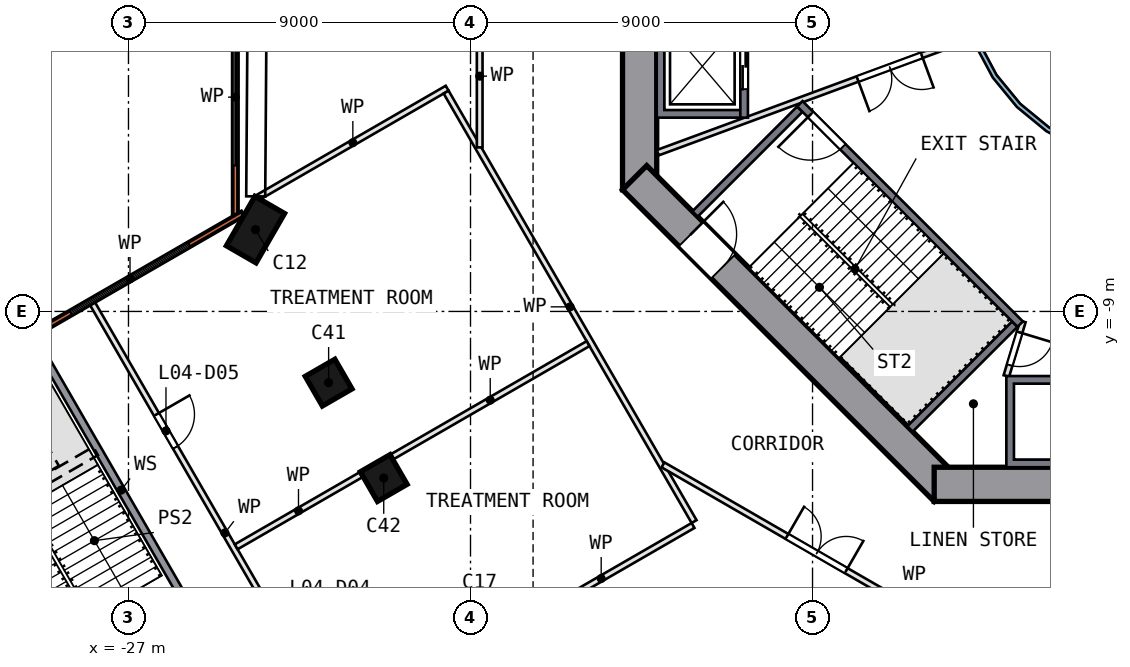
"""IFC4 building model, lengths in metres.
Left out: names, types, materials, properties, quantities, classifications, styles, units other than length and angle.
Written with IfcOpenShell. Run it as: python <this file> out.ifc"""

import sys

from ifc_helpers import new_model, si_unit, direction, frame, frame_2d, origin, origin_2d, place, context, subcontext, project, spatial, polyline, rectangle, outline, extrude, element, fill, save


model = new_model("IFC4")
c1 = context("Model", 3, precision=1e-05, world=origin(), true_north=direction((0.0, 1.0)))
c2 = subcontext(c1, "Body", "Model", "MODEL_VIEW")
j1 = project(units=[si_unit("LENGTHUNIT", "METRE"), si_unit("PLANEANGLEUNIT", "RADIAN")], contexts=[c1])
p1 = place(None, origin())
s1 = spatial("IfcSite", under=j1, at=p1, CompositionType="ELEMENT")
p2 = place(p1, origin())
s2 = spatial("IfcBuilding", under=s1, at=p2, CompositionType="ELEMENT")
p3 = place(p2, frame((0.0, 0.0, 23.5)))
s3 = spatial("IfcBuildingStorey", under=s2, at=p3, CompositionType="ELEMENT", Elevation=23.5)
p4 = place(p3, frame((-23.658, -6.846, 0.0), z_axis=(0.0, 0.0, 1.0), x_axis=(0.5, 0.866025404, 0.0)))
e1 = element("IfcColumn", 1, at=p4, inside=s3, PredefinedType="COLUMN", context=c2, shape_type="SweptSolid", body=[
    extrude(rectangle(XDim=1.5, YDim=0.9, at=origin_2d()), origin(), (0.0, 0.0, 1.0), 4.0),
])
for number, where, z_axis, x_axis in (
    (2, (-21.733, -10.873, 0.0), (0.0, 0.0, 1.0), (-0.866, -0.5, 0.0)),
    (3, (-20.283, -13.385, 0.0), (0.0, 0.0, 1.0), (-0.866, -0.5, 0.0)),
):
    element("IfcColumn", number, at=place(p3, frame(where, z_axis=z_axis, x_axis=x_axis)), inside=s3, PredefinedType="COLUMN", context=c2, shape_type="SweptSolid", body=[
        extrude(rectangle(XDim=0.9, YDim=0.9, at=origin_2d()), origin(), (0.0, 0.0, 1.0), 4.0),
    ])
p5 = place(p3, frame((-13.55, 5.799, 0.0), z_axis=(0.0, 0.0, 1.0), x_axis=(0.0, -1.0, 0.0)))
e4 = element("IfcWall", 4, at=p5, inside=s3, PredefinedType="SHEAR", context=c2, shape_type="SweptSolid", body=[
    extrude(rectangle(XDim=11.598, YDim=0.9, at=frame_2d((5.799, 0.0))), origin(), (0.0, 0.0, 1.0), 4.5),
])
p6 = place(p5, frame((4.899, 0.0, 0.0)))
e5 = element("IfcOpeningElement", 5, at=p6, cuts=e4, PredefinedType="OPENING", context=c2, shape_type="SweptSolid", body=[
    extrude(rectangle(XDim=1.8, YDim=2.1, at=frame_2d((0.9, 1.05))), frame((0.0, 0.46, 0.0), z_axis=(0.0, -1.0, 0.0), x_axis=(1.0, 0.0, 0.0)), (0.0, 0.0, 1.0), 0.92),
])
p7 = place(p3, frame((-13.682, -5.481, 0.0), z_axis=(0.0, 0.0, 1.0), x_axis=(0.707106781, -0.707106781, 0.0)))
e6 = element("IfcWall", 6, at=p7, inside=s3, PredefinedType="SHEAR", context=c2, shape_type="SweptSolid", body=[
    extrude(rectangle(XDim=11.598, YDim=0.9, at=frame_2d((5.799, 0.0))), origin(), (0.0, 0.0, 1.0), 4.5),
])
p8 = place(p7, frame((2.099, 0.0, 0.0)))
e7 = element("IfcOpeningElement", 7, at=p8, cuts=e6, PredefinedType="OPENING", context=c2, shape_type="SweptSolid", body=[
    extrude(rectangle(XDim=1.2, YDim=2.1, at=frame_2d((0.6, 1.05))), frame((0.0, 0.46, 0.0), z_axis=(0.0, -1.0, 0.0), x_axis=(1.0, 0.0, 0.0)), (0.0, 0.0, 1.0), 0.92),
])
p9 = place(p3, frame((-5.799, -13.55, 0.0), z_axis=(0.0, 0.0, 1.0), x_axis=(1.0, 0.0, 0.0)))
e8 = element("IfcWall", 8, at=p9, inside=s3, PredefinedType="SHEAR", context=c2, shape_type="SweptSolid", body=[
    extrude(rectangle(XDim=11.598, YDim=0.9, at=frame_2d((5.799, 0.0))), origin(), (0.0, 0.0, 1.0), 4.5),
])
p10 = place(p9, frame((4.899, 0.0, 0.0)))
e9 = element("IfcOpeningElement", 9, at=p10, cuts=e8, PredefinedType="OPENING", context=c2, shape_type="SweptSolid", body=[
    extrude(rectangle(XDim=1.8, YDim=2.1, at=frame_2d((0.9, 1.05))), frame((0.0, 0.46, 0.0), z_axis=(0.0, -1.0, 0.0), x_axis=(1.0, 0.0, 0.0)), (0.0, 0.0, 1.0), 0.92),
])
p11 = place(p3, frame((-24.188, 6.341, 0.0), z_axis=(0.0, 0.0, 1.0), x_axis=(0.0, -1.0, 0.0)))
e10 = element("IfcWall", 10, at=p11, inside=s3, PredefinedType="SOLIDWALL", context=c2, shape_type="SweptSolid", body=[
    extrude(rectangle(XDim=12.801, YDim=0.14, at=frame_2d((6.4, 0.0))), origin(), (0.0, 0.0, 1.0), 4.0),
])
p12 = place(p11, frame((1.748, 0.0, 0.9)))
e11 = element("IfcOpeningElement", 11, at=p12, cuts=e10, PredefinedType="OPENING", context=c2, shape_type="SweptSolid", body=[
    extrude(rectangle(XDim=3.0, YDim=2.4, at=frame_2d((1.5, 1.2))), frame((0.0, 0.08, 0.0), z_axis=(0.0, -1.0, 0.0), x_axis=(1.0, 0.0, 0.0)), (0.0, 0.0, 1.0), 0.16),
])
p13 = place(p11, frame((7.902, 0.0, 0.9)))
e12 = element("IfcOpeningElement", 12, at=p13, cuts=e10, PredefinedType="OPENING", context=c2, shape_type="SweptSolid", body=[
    extrude(rectangle(XDim=3.6, YDim=2.4, at=frame_2d((1.8, 1.2))), frame((0.0, 0.08, 0.0), z_axis=(0.0, -1.0, 0.0), x_axis=(1.0, 0.0, 0.0)), (0.0, 0.0, 1.0), 0.16),
])
p14 = place(p3, frame((-23.995, -6.429, 0.0), z_axis=(0.0, 0.0, 1.0), x_axis=(-0.866018753, -0.500011519, 0.0)))
e13 = element("IfcWall", 13, at=p14, inside=s3, PredefinedType="SOLIDWALL", context=c2, shape_type="SweptSolid", body=[
    extrude(rectangle(XDim=11.405, YDim=0.14, at=frame_2d((5.703, 0.0))), origin(), (0.0, 0.0, 1.0), 4.0),
])
p15 = place(p14, frame((1.623, 0.0, 0.9)))
e14 = element("IfcOpeningElement", 14, at=p15, cuts=e13, PredefinedType="OPENING", context=c2, shape_type="SweptSolid", body=[
    extrude(rectangle(XDim=3.6, YDim=2.4, at=frame_2d((1.8, 1.2))), frame((0.0, 0.08, 0.0), z_axis=(0.0, -1.0, 0.0), x_axis=(1.0, 0.0, 0.0)), (0.0, 0.0, 1.0), 0.16),
])
p16 = place(p3, origin())
e15 = element("IfcWall", 15, at=p16, inside=s3, PredefinedType="SOLIDWALL", context=c2, shape_type="SweptSolid", body=[
    extrude(outline(polyline([(-13.1, -3.9), (-13.1, -1.2), (-10.9, -1.2), (-10.9, -1.4), (-12.9, -1.4), (-12.9, -3.7), (-10.9, -3.7), (-10.9, -3.9), (-13.1, -3.9)])), origin(), (0.0, 0.0, 1.0), 4.0),
])
p17 = place(p3, frame((-10.8, -1.2, 0.0), z_axis=(0.0, 0.0, 1.0), x_axis=(0.0, -1.0, 0.0)))
e16 = element("IfcWall", 16, at=p17, inside=s3, PredefinedType="SOLIDWALL", context=c2, shape_type="SweptSolid", body=[
    extrude(rectangle(XDim=2.7, YDim=0.2, at=frame_2d((1.35, 0.0))), origin(), (0.0, 0.0, 1.0), 4.0),
])
p18 = place(p17, frame((0.75, 0.0, 0.0)))
e17 = element("IfcOpeningElement", 17, at=p18, cuts=e16, PredefinedType="OPENING", context=c2, shape_type="SweptSolid", body=[
    extrude(rectangle(XDim=1.2, YDim=2.1, at=frame_2d((0.6, 1.05))), frame((0.0, 0.11, 0.0), z_axis=(0.0, -1.0, 0.0), x_axis=(1.0, 0.0, 0.0)), (0.0, 0.0, 1.0), 0.22),
])
p19 = place(p3, origin())
e18 = element("IfcWall", 18, at=p19, inside=s3, PredefinedType="SOLIDWALL", context=c2, shape_type="SweptSolid", body=[
    extrude(outline(polyline([(-1.2, -13.1), (-3.9, -13.1), (-3.9, -10.7), (-1.2, -10.7), (-1.2, -13.1)]), holes=[polyline([(-3.7, -10.9), (-3.7, -12.9), (-1.4, -12.9), (-1.4, -10.9), (-3.7, -10.9)])]), origin(), (0.0, 0.0, 1.0), 4.0),
])
p20 = place(p3, frame((-3.535, -9.334, 0.0), z_axis=(0.0, 0.0, 1.0), x_axis=(-0.707106781, 0.707106781, 0.0)))
e19 = element("IfcWall", 19, at=p20, inside=s3, PredefinedType="SOLIDWALL", context=c2, shape_type="SweptSolid", body=[
    extrude(rectangle(XDim=8.2, YDim=0.2, at=frame_2d((4.1, 0.0))), origin(), (0.0, 0.0, 1.0), 4.0),
])
p21 = place(p20, frame((6.6, 0.0, 0.0)))
e20 = element("IfcOpeningElement", 20, at=p21, cuts=e19, PredefinedType="OPENING", context=c2, shape_type="SweptSolid", body=[
    extrude(rectangle(XDim=1.2, YDim=2.1, at=frame_2d((0.6, 1.05))), frame((0.0, 0.11, 0.0), z_axis=(0.0, -1.0, 0.0), x_axis=(1.0, 0.0, 0.0)), (0.0, 0.0, 1.0), 0.22),
])
for number, where, z_axis, x_axis in (
    (21, (-9.334, -3.677, 0.0), (0.0, 0.0, 1.0), (-0.707, -0.707, 0.0)),
    (22, (-3.677, -9.334, 0.0), (0.0, 0.0, 1.0), (-0.707, -0.707, 0.0)),
):
    element("IfcWall", number, at=place(p3, frame(where, z_axis=z_axis, x_axis=x_axis)), inside=s3, PredefinedType="SOLIDWALL", context=c2, shape_type="SweptSolid", body=[
        extrude(rectangle(XDim=3.9, YDim=0.2, at=frame_2d((1.95, 0.0))), origin(), (0.0, 0.0, 1.0), 4.0),
    ])
p22 = place(p3, frame((-3.465, -9.263, 0.0), z_axis=(0.0, 0.0, 1.0), x_axis=(-0.289808785, -0.957084567, 0.0)))
e23 = element("IfcWall", 23, at=p22, inside=s3, PredefinedType="PARTITIONING", context=c2, shape_type="SweptSolid", body=[
    extrude(rectangle(XDim=1.501, YDim=0.15, at=frame_2d((0.75, 0.0))), origin(), (0.0, 0.0, 1.0), 4.0),
])
p23 = place(p22, frame((0.301, 0.0, 0.0)))
e24 = element("IfcOpeningElement", 24, at=p23, cuts=e23, PredefinedType="OPENING", context=c2, shape_type="SweptSolid", body=[
    extrude(rectangle(XDim=0.9, YDim=2.1, at=frame_2d((0.45, 1.05))), frame((0.0, 0.085, 0.0), z_axis=(0.0, -1.0, 0.0), x_axis=(1.0, 0.0, 0.0)), (0.0, 0.0, 1.0), 0.17),
])
p24 = place(p3, frame((-4.813, -1.776, 0.0), z_axis=(0.0, 0.0, 1.0), x_axis=(-0.93819293, -0.346112737, 0.0)))
e25 = element("IfcWall", 25, at=p24, inside=s3, PredefinedType="PARTITIONING", context=c2, shape_type="SweptSolid", body=[
    extrude(rectangle(XDim=8.803, YDim=0.15, at=frame_2d((4.402, 0.0))), origin(), (0.0, 0.0, 1.0), 4.0),
])
p25 = place(p24, frame((1.4, 0.0, 0.0)))
e26 = element("IfcOpeningElement", 26, at=p25, cuts=e25, PredefinedType="OPENING", context=c2, shape_type="SweptSolid", body=[
    extrude(rectangle(XDim=1.8, YDim=2.1, at=frame_2d((0.9, 1.05))), frame((0.0, 0.085, 0.0), z_axis=(0.0, -1.0, 0.0), x_axis=(1.0, 0.0, 0.0)), (0.0, 0.0, 1.0), 0.17),
])
p26 = place(p3, origin())
e27 = element("IfcWall", 27, at=p26, inside=s3, PredefinedType="SOLIDWALL", context=c2, shape_type="SweptSolid", body=[
    extrude(outline(polyline([(5.021, -0.999), (4.73, -1.959), (4.257, -2.844), (3.62, -3.62), (2.844, -4.257), (1.959, -4.73), (0.999, -5.021), (0.0, -5.12), (-0.999, -5.021), (-1.959, -4.73), (-2.844, -4.257), (-3.62, -3.62), (-4.257, -2.844), (-4.73, -1.959), (-5.021, -0.999), (-5.12, 0.0), (-5.021, 0.999), (-4.73, 1.959), (-4.257, 2.844), (-3.62, 3.62), (-2.844, 4.257), (-1.959, 4.73), (-0.999, 5.021), (0.0, 5.12), (0.999, 5.021), (1.959, 4.73), (2.844, 4.257), (3.62, 3.62), (4.257, 2.844), (4.73, 1.959), (5.021, 0.999), (5.12, 0.0), (5.021, -0.999)]), holes=[polyline([(4.904, 0.976), (4.619, 1.913), (4.157, 2.778), (3.535, 3.535), (2.778, 4.157), (1.913, 4.619), (0.976, 4.904), (0.0, 5.0), (-0.976, 4.904), (-1.913, 4.619), (-2.778, 4.157), (-3.535, 3.535), (-4.157, 2.778), (-4.619, 1.913), (-4.904, 0.976), (-5.0, 0.0), (-4.904, -0.976), (-4.619, -1.913), (-4.157, -2.778), (-3.535, -3.535), (-2.778, -4.157), (-1.913, -4.619), (-0.976, -4.904), (0.0, -5.0), (0.976, -4.904), (1.913, -4.619), (2.778, -4.157), (3.535, -3.535), (4.157, -2.778), (4.619, -1.913), (4.904, -0.976), (5.0, 0.0), (4.904, 0.976)])]), origin(), (0.0, 0.0, 1.0), 4.0),
])
p27 = place(p3, frame((-32.807, -13.577, 0.0), z_axis=(0.0, 0.0, 1.0), x_axis=(0.50000534, -0.866022321, 0.0)))
e28 = element("IfcWall", 28, at=p27, inside=s3, PredefinedType="SOLIDWALL", context=c2, shape_type="SweptSolid", body=[
    extrude(rectangle(XDim=7.545, YDim=0.2, at=frame_2d((3.773, 0.0))), origin(), (0.0, 0.0, 1.0), 4.0),
])
p28 = place(p3, frame((-24.877, -17.712, 0.0), z_axis=(0.0, 0.0, 1.0), x_axis=(-0.499984148, 0.866034555, 0.0)))
e29 = element("IfcWall", 29, at=p28, inside=s3, PredefinedType="SOLIDWALL", context=c2, shape_type="SweptSolid", body=[
    extrude(rectangle(XDim=9.26, YDim=0.2, at=frame_2d((4.63, 0.0))), origin(), (0.0, 0.0, 1.0), 4.0),
])
p29 = place(p3, frame((-27.948, -8.792, 0.0), z_axis=(0.0, 0.0, 1.0), x_axis=(0.499991053, -0.866030569, 0.0)))
e30 = element("IfcWall", 30, at=p29, inside=s3, PredefinedType="PARTITIONING", context=c2, shape_type="SweptSolid", body=[
    extrude(rectangle(XDim=12.72, YDim=0.15, at=frame_2d((6.36, 0.0))), origin(), (0.0, 0.0, 1.0), 4.0),
])
p30 = place(p29, frame((9.57, 0.0, 0.0)))
e31 = element("IfcOpeningElement", 31, at=p30, cuts=e30, PredefinedType="OPENING", context=c2, shape_type="SweptSolid", body=[
    extrude(rectangle(XDim=1.0, YDim=2.1, at=frame_2d((0.5, 1.05))), frame((0.0, 0.085, 0.0), z_axis=(0.0, -1.0, 0.0), x_axis=(1.0, 0.0, 0.0)), (0.0, 0.0, 1.0), 0.17),
])
p31 = place(p29, frame((3.37, 0.0, 0.0)))
e32 = element("IfcOpeningElement", 32, at=p31, cuts=e30, PredefinedType="OPENING", context=c2, shape_type="SweptSolid", body=[
    extrude(rectangle(XDim=1.0, YDim=2.1, at=frame_2d((0.5, 1.05))), frame((0.0, 0.085, 0.0), z_axis=(0.0, -1.0, 0.0), x_axis=(1.0, 0.0, 0.0)), (0.0, 0.0, 1.0), 0.17),
])
p32 = place(p3, frame((-18.614, -3.126, 0.0), z_axis=(0.0, 0.0, 1.0), x_axis=(-0.866030255, -0.499991598, 0.0)))
e33 = element("IfcWall", 33, at=p32, inside=s3, PredefinedType="PARTITIONING", context=c2, shape_type="SweptSolid", body=[
    extrude(rectangle(XDim=5.732, YDim=0.15, at=frame_2d((2.866, 0.0))), origin(), (0.0, 0.0, 1.0), 4.0),
])
p33 = place(p3, frame((-18.642, -3.228, 0.0), z_axis=(0.0, 0.0, 1.0), x_axis=(0.499998298, -0.866026387, 0.0)))
e34 = element("IfcWall", 34, at=p33, inside=s3, PredefinedType="PARTITIONING", context=c2, shape_type="SweptSolid", body=[
    extrude(rectangle(XDim=13.05, YDim=0.15, at=frame_2d((6.525, 0.0))), origin(), (0.0, 0.0, 1.0), 4.0),
])
p34 = place(p3, frame((-17.758, 4.833, 0.0), z_axis=(0.0, 0.0, 1.0), x_axis=(0.0, -1.0, 0.0)))
e35 = element("IfcWall", 35, at=p34, inside=s3, PredefinedType="PARTITIONING", context=c2, shape_type="SweptSolid", body=[
    extrude(rectangle(XDim=9.517, YDim=0.15, at=frame_2d((4.758, 0.0))), origin(), (0.0, 0.0, 1.0), 4.0),
])
p35 = place(p34, frame((3.767, 0.0, 0.0)))
e36 = element("IfcOpeningElement", 36, at=p35, cuts=e35, PredefinedType="OPENING", context=c2, shape_type="SweptSolid", body=[
    extrude(rectangle(XDim=1.8, YDim=2.1, at=frame_2d((0.9, 1.05))), frame((0.0, 0.085, 0.0), z_axis=(0.0, -1.0, 0.0), x_axis=(1.0, 0.0, 0.0)), (0.0, 0.0, 1.0), 0.17),
])
p36 = place(p3, frame((-16.978, -17.424, 0.0), z_axis=(0.0, 0.0, 1.0), x_axis=(0.866016603, 0.500015243, 0.0)))
e37 = element("IfcWall", 37, at=p36, inside=s3, PredefinedType="PARTITIONING", context=c2, shape_type="SweptSolid", body=[
    extrude(rectangle(XDim=5.582, YDim=0.15, at=frame_2d((2.791, 0.0))), origin(), (0.0, 0.0, 1.0), 4.0),
])
p37 = place(p3, frame((-20.886, -13.3, 0.0), z_axis=(0.0, 0.0, 1.0), x_axis=(-0.866012734, -0.500021944, 0.0)))
e38 = element("IfcWall", 38, at=p37, inside=s3, PredefinedType="PARTITIONING", context=c2, shape_type="SweptSolid", body=[
    extrude(rectangle(XDim=3.787, YDim=0.15, at=frame_2d((1.894, 0.0))), origin(), (0.0, 0.0, 1.0), 4.0),
])
p38 = place(p3, frame((-14.906, -9.848, 0.0), z_axis=(0.0, 0.0, 1.0), x_axis=(-0.866038559, -0.499977214, 0.0)))
e39 = element("IfcWall", 39, at=p38, inside=s3, PredefinedType="PARTITIONING", context=c2, shape_type="SweptSolid", body=[
    extrude(rectangle(XDim=5.945, YDim=0.15, at=frame_2d((2.973, 0.0))), origin(), (0.0, 0.0, 1.0), 4.0),
])
p39 = place(p3, frame((-12.935, -13.038, 0.0), z_axis=(0.0, 0.0, 1.0), x_axis=(0.866027519, -0.499996337, 0.0)))
e40 = element("IfcWall", 40, at=p39, inside=s3, PredefinedType="PARTITIONING", context=c2, shape_type="SweptSolid", body=[
    extrude(rectangle(XDim=9.517, YDim=0.15, at=frame_2d((4.758, 0.0))), origin(), (0.0, 0.0, 1.0), 4.0),
])
p40 = place(p39, frame((3.767, 0.0, 0.0)))
e41 = element("IfcOpeningElement", 41, at=p40, cuts=e40, PredefinedType="OPENING", context=c2, shape_type="SweptSolid", body=[
    extrude(rectangle(XDim=1.8, YDim=2.1, at=frame_2d((0.9, 1.05))), frame((0.0, 0.085, 0.0), z_axis=(0.0, -1.0, 0.0), x_axis=(1.0, 0.0, 0.0)), (0.0, 0.0, 1.0), 0.17),
])
p41 = place(p13, origin())
e42 = element("IfcWindow", 42, at=p41, inside=s3, PartitioningType="SINGLE_PANEL", PredefinedType="WINDOW", context=c2, shape_type="SweptSolid", body=[
    extrude(rectangle(XDim=3.6, YDim=2.4, at=frame_2d((1.8, 1.2))), frame((0.0, 0.03, 0.0), z_axis=(0.0, -1.0, 0.0), x_axis=(1.0, 0.0, 0.0)), (0.0, 0.0, 1.0), 0.06),
])
fill(e12, e42)
p42 = place(p15, origin())
e43 = element("IfcWindow", 43, at=p42, inside=s3, PartitioningType="SINGLE_PANEL", PredefinedType="WINDOW", context=c2, shape_type="SweptSolid", body=[
    extrude(rectangle(XDim=3.6, YDim=2.4, at=frame_2d((1.8, 1.2))), frame((0.0, 0.03, 0.0), z_axis=(0.0, -1.0, 0.0), x_axis=(1.0, 0.0, 0.0)), (0.0, 0.0, 1.0), 0.06),
])
fill(e14, e43)
p43 = place(p18, origin())
e44 = element("IfcDoor", 44, at=p43, inside=s3, OperationType="DOUBLE_DOOR_SLIDING", PredefinedType="DOOR", context=c2, shape_type="SweptSolid", body=[
    extrude(rectangle(XDim=1.2, YDim=2.1, at=frame_2d((0.6, 1.05))), frame((0.0, 0.025, 0.0), z_axis=(0.0, -1.0, 0.0), x_axis=(1.0, 0.0, 0.0)), (0.0, 0.0, 1.0), 0.05),
])
fill(e17, e44)
p44 = place(p21, origin())
e45 = element("IfcDoor", 45, at=p44, inside=s3, OperationType="SINGLE_SWING_RIGHT", PredefinedType="DOOR", context=c2, shape_type="SweptSolid", body=[
    extrude(rectangle(XDim=1.2, YDim=2.1, at=frame_2d((0.6, 1.05))), frame((0.0, 0.025, 0.0), z_axis=(0.0, -1.0, 0.0), x_axis=(1.0, 0.0, 0.0)), (0.0, 0.0, 1.0), 0.05),
])
fill(e20, e45)
p45 = place(p8, origin())
e46 = element("IfcDoor", 46, at=p45, inside=s3, OperationType="SINGLE_SWING_LEFT", PredefinedType="DOOR", context=c2, shape_type="SweptSolid", body=[
    extrude(rectangle(XDim=1.2, YDim=2.1, at=frame_2d((0.6, 1.05))), frame((0.0, 0.025, 0.0), z_axis=(0.0, -1.0, 0.0), x_axis=(1.0, 0.0, 0.0)), (0.0, 0.0, 1.0), 0.05),
])
fill(e7, e46)
p46 = place(p23, origin())
e47 = element("IfcDoor", 47, at=p46, inside=s3, OperationType="SINGLE_SWING_LEFT", PredefinedType="DOOR", context=c2, shape_type="SweptSolid", body=[
    extrude(rectangle(XDim=0.9, YDim=2.1, at=frame_2d((0.45, 1.05))), frame((0.0, 0.025, 0.0), z_axis=(0.0, -1.0, 0.0), x_axis=(1.0, 0.0, 0.0)), (0.0, 0.0, 1.0), 0.05),
])
fill(e24, e47)
p47 = place(p25, origin())
e48 = element("IfcDoor", 48, at=p47, inside=s3, OperationType="DOUBLE_DOOR_SINGLE_SWING", PredefinedType="DOOR", context=c2, shape_type="SweptSolid", body=[
    extrude(rectangle(XDim=1.8, YDim=2.1, at=frame_2d((0.9, 1.05))), frame((0.0, 0.025, 0.0), z_axis=(0.0, -1.0, 0.0), x_axis=(1.0, 0.0, 0.0)), (0.0, 0.0, 1.0), 0.05),
])
fill(e26, e48)
p48 = place(p31, origin())
e49 = element("IfcDoor", 49, at=p48, inside=s3, OperationType="SINGLE_SWING_LEFT", PredefinedType="DOOR", context=c2, shape_type="SweptSolid", body=[
    extrude(rectangle(XDim=1.0, YDim=2.1, at=frame_2d((0.5, 1.05))), frame((0.0, 0.025, 0.0), z_axis=(0.0, -1.0, 0.0), x_axis=(1.0, 0.0, 0.0)), (0.0, 0.0, 1.0), 0.05),
])
fill(e32, e49)
p49 = place(p40, origin())
e50 = element("IfcDoor", 50, at=p49, inside=s3, OperationType="DOUBLE_DOOR_SINGLE_SWING", PredefinedType="DOOR", context=c2, shape_type="SweptSolid", body=[
    extrude(rectangle(XDim=1.8, YDim=2.1, at=frame_2d((0.9, 1.05))), frame((0.0, 0.025, 0.0), z_axis=(0.0, -1.0, 0.0), x_axis=(1.0, 0.0, 0.0)), (0.0, 0.0, 1.0), 0.05),
])
fill(e41, e50)
save(model, sys.argv[1])
